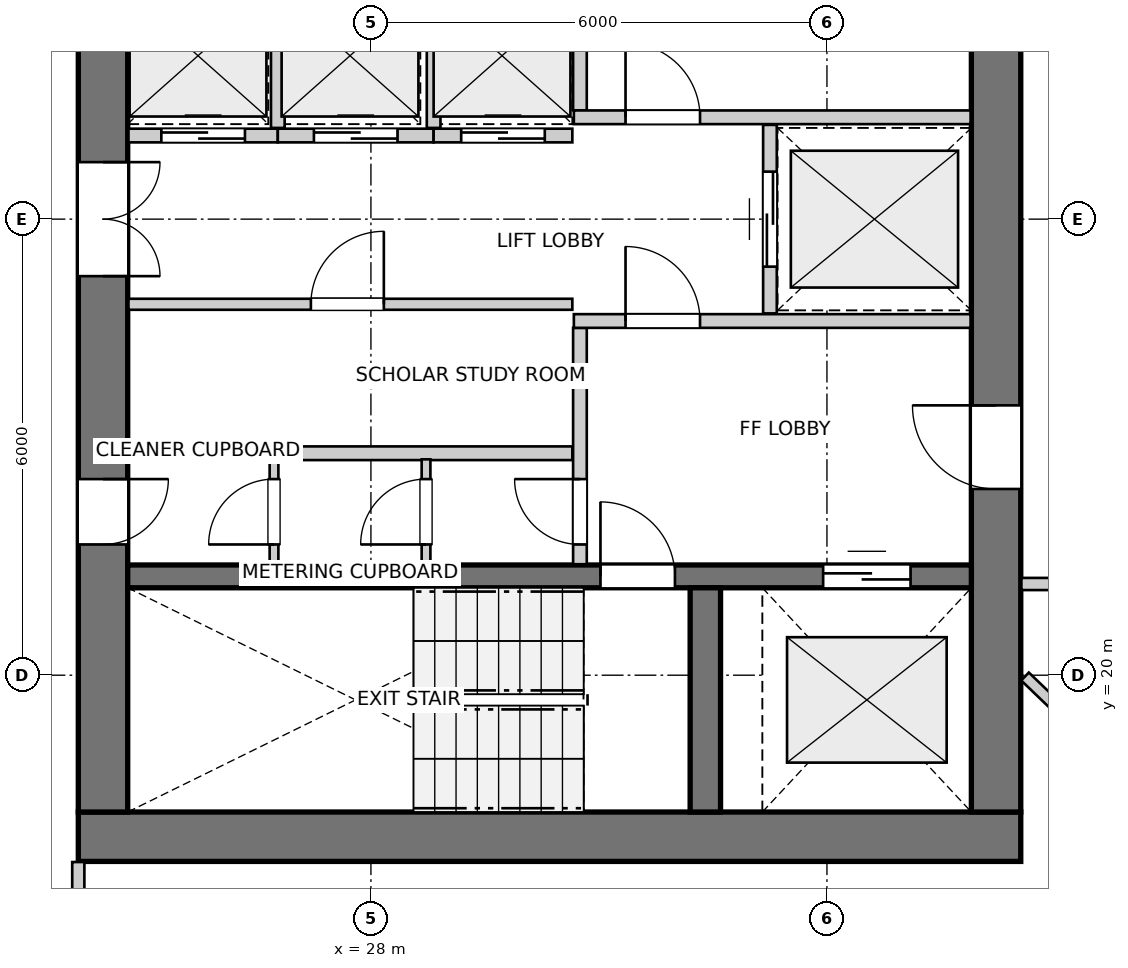
"""IFC4 building model, lengths in metres.
Left out: names, types, materials, properties, quantities, classifications, styles, units other than length and angle.
Written with IfcOpenShell. Run it as: python <this file> out.ifc"""

import sys

from ifc_helpers import new_model, si_unit, direction, frame, frame_2d, origin, place, context, subcontext, project, spatial, rectangle, extrude, source, transform, mapped, element, fill, save


model = new_model("IFC4")
c1 = context("Model", 3, precision=1e-05, world=origin(), true_north=direction((0.0, 1.0)))
c2 = subcontext(c1, "Body", "Model", "MODEL_VIEW")
j1 = project(units=[si_unit("LENGTHUNIT", "METRE"), si_unit("PLANEANGLEUNIT", "RADIAN")], contexts=[c1])
p1 = place(None, origin())
s1 = spatial("IfcSite", under=j1, at=p1, CompositionType="ELEMENT")
p2 = place(p1, origin())
s2 = spatial("IfcBuilding", under=s1, at=p2, CompositionType="ELEMENT")
p3 = place(p2, frame((0.0, 0.0, 158.6)))
s3 = spatial("IfcBuildingStorey", under=s2, at=p3, CompositionType="ELEMENT", Elevation=158.6)
p4 = place(p3, frame((24.15, 17.875, 0.0), z_axis=(0.0, 0.0, 1.0), x_axis=(1.0, 0.0, 0.0)))
e1 = element("IfcWall", 1, at=p4, inside=s3, PredefinedType="SHEAR", context=c2, shape_type="SweptSolid", body=[
    extrude(rectangle(XDim=12.4, YDim=0.65, at=frame_2d((6.2, 0.0))), origin(), (0.0, 0.0, 1.0), 2.95),
])
p5 = place(p3, frame((24.475, 33.8, 0.0), z_axis=(0.0, 0.0, 1.0), x_axis=(0.0, -1.0, 0.0)))
e2 = element("IfcWall", 2, at=p5, inside=s3, PredefinedType="SHEAR", context=c2, shape_type="SweptSolid", body=[
    extrude(rectangle(XDim=15.6, YDim=0.65, at=frame_2d((7.8, 0.0))), origin(), (0.0, 0.0, 1.0), 2.95),
])
p6 = place(p5, frame((7.05, 0.0, 0.0)))
e3 = element("IfcOpeningElement", 3, at=p6, cuts=e2, PredefinedType="OPENING", context=c2, shape_type="SweptSolid", body=[
    extrude(rectangle(XDim=1.5, YDim=2.15, at=frame_2d((0.75, 1.075))), frame((0.0, 0.335, 0.0), z_axis=(0.0, -1.0, 0.0), x_axis=(1.0, 0.0, 0.0)), (0.0, 0.0, 1.0), 0.67),
])
p7 = place(p5, frame((3.52, 0.0, 0.0)))
e4 = element("IfcOpeningElement", 4, at=p7, cuts=e2, PredefinedType="OPENING", context=c2, shape_type="SweptSolid", body=[
    extrude(rectangle(XDim=0.86, YDim=2.05, at=frame_2d((0.43, 1.025))), frame((0.0, 0.335, 0.0), z_axis=(0.0, -1.0, 0.0), x_axis=(1.0, 0.0, 0.0)), (0.0, 0.0, 1.0), 0.67),
])
p8 = place(p5, frame((11.22, 0.0, 0.0)))
e5 = element("IfcOpeningElement", 5, at=p8, cuts=e2, PredefinedType="OPENING", context=c2, shape_type="SweptSolid", body=[
    extrude(rectangle(XDim=0.86, YDim=2.05, at=frame_2d((0.43, 1.025))), frame((0.0, 0.335, 0.0), z_axis=(0.0, -1.0, 0.0), x_axis=(1.0, 0.0, 0.0)), (0.0, 0.0, 1.0), 0.67),
])
p9 = place(p3, frame((36.225, 18.2, 0.0), z_axis=(0.0, 0.0, 1.0), x_axis=(0.0, 1.0, 0.0)))
e6 = element("IfcWall", 6, at=p9, inside=s3, PredefinedType="SHEAR", context=c2, shape_type="SweptSolid", body=[
    extrude(rectangle(XDim=15.6, YDim=0.65, at=frame_2d((7.8, 0.0))), origin(), (0.0, 0.0, 1.0), 2.95),
])
p10 = place(p9, frame((4.25, 0.0, 0.0)))
e7 = element("IfcOpeningElement", 7, at=p10, cuts=e6, PredefinedType="OPENING", context=c2, shape_type="SweptSolid", body=[
    extrude(rectangle(XDim=1.1, YDim=2.15, at=frame_2d((0.55, 1.075))), frame((0.0, 0.335, 0.0), z_axis=(0.0, -1.0, 0.0), x_axis=(1.0, 0.0, 0.0)), (0.0, 0.0, 1.0), 0.67),
])
p11 = place(p9, frame((10.25, 0.0, 0.0)))
e8 = element("IfcOpeningElement", 8, at=p11, cuts=e6, PredefinedType="OPENING", context=c2, shape_type="SweptSolid", body=[
    extrude(rectangle(XDim=1.1, YDim=2.15, at=frame_2d((0.55, 1.075))), frame((0.0, 0.335, 0.0), z_axis=(0.0, -1.0, 0.0), x_axis=(1.0, 0.0, 0.0)), (0.0, 0.0, 1.0), 0.67),
])
p12 = place(p3, frame((24.8, 21.3, 0.0), z_axis=(0.0, 0.0, 1.0), x_axis=(1.0, 0.0, 0.0)))
e9 = element("IfcWall", 9, at=p12, inside=s3, PredefinedType="SHEAR", context=c2, shape_type="SweptSolid", body=[
    extrude(rectangle(XDim=11.1, YDim=0.3, at=frame_2d((5.55, 0.0))), origin(), (0.0, 0.0, 1.0), 2.95),
])
p13 = place(p12, frame((6.22, 0.0, 0.0)))
e10 = element("IfcOpeningElement", 10, at=p13, cuts=e9, PredefinedType="OPENING", context=c2, shape_type="SweptSolid", body=[
    extrude(rectangle(XDim=0.98, YDim=2.15, at=frame_2d((0.49, 1.075))), frame((0.0, 0.16, 0.0), z_axis=(0.0, -1.0, 0.0), x_axis=(1.0, 0.0, 0.0)), (0.0, 0.0, 1.0), 0.32),
])
p14 = place(p12, frame((9.15, 0.0, 0.0)))
e11 = element("IfcOpeningElement", 11, at=p14, cuts=e9, PredefinedType="OPENING", context=c2, shape_type="SweptSolid", body=[
    extrude(rectangle(XDim=1.15, YDim=2.15, at=frame_2d((0.575, 1.075))), frame((0.0, 0.16, 0.0), z_axis=(0.0, -1.0, 0.0), x_axis=(1.0, 0.0, 0.0)), (0.0, 0.0, 1.0), 0.32),
])
p15 = place(p3, frame((32.4, 18.2, 0.0), z_axis=(0.0, 0.0, 1.0), x_axis=(0.0, 1.0, 0.0)))
e12 = element("IfcWall", 12, at=p15, inside=s3, PredefinedType="SHEAR", context=c2, shape_type="SweptSolid", body=[
    extrude(rectangle(XDim=2.95, YDim=0.4, at=frame_2d((1.475, 0.0))), origin(), (0.0, 0.0, 1.0), 2.95),
])
p16 = place(p3, frame((30.75, 21.46, 0.0), z_axis=(0.0, 0.0, 1.0), x_axis=(0.0, 1.0, 0.0)))
e13 = element("IfcWall", 13, at=p16, inside=s3, PredefinedType="PARTITIONING", context=c2, shape_type="SweptSolid", body=[
    extrude(rectangle(XDim=3.11, YDim=0.18, at=frame_2d((1.555, 0.0))), origin(), (0.0, 0.0, 1.0), 2.95),
])
p17 = place(p16, frame((0.26, 0.0, 0.0)))
e14 = element("IfcOpeningElement", 14, at=p17, cuts=e13, PredefinedType="OPENING", context=c2, shape_type="SweptSolid", body=[
    extrude(rectangle(XDim=0.86, YDim=2.05, at=frame_2d((0.43, 1.025))), frame((0.0, 0.1, 0.0), z_axis=(0.0, -1.0, 0.0), x_axis=(1.0, 0.0, 0.0)), (0.0, 0.0, 1.0), 0.2),
])
p18 = place(p3, frame((30.67, 24.66, 0.0), z_axis=(0.0, 0.0, 1.0), x_axis=(1.0, 0.0, 0.0)))
e15 = element("IfcWall", 15, at=p18, inside=s3, PredefinedType="PARTITIONING", context=c2, shape_type="SweptSolid", body=[
    extrude(rectangle(XDim=5.22, YDim=0.18, at=frame_2d((2.61, 0.0))), origin(), (0.0, 0.0, 1.0), 2.95),
])
p19 = place(p18, frame((0.68, 0.0, 0.0)))
e16 = element("IfcOpeningElement", 16, at=p19, cuts=e15, PredefinedType="OPENING", context=c2, shape_type="SweptSolid", body=[
    extrude(rectangle(XDim=0.98, YDim=2.15, at=frame_2d((0.49, 1.075))), frame((0.0, 0.1, 0.0), z_axis=(0.0, -1.0, 0.0), x_axis=(1.0, 0.0, 0.0)), (0.0, 0.0, 1.0), 0.2),
])
p20 = place(p3, frame((30.75, 27.43, 0.0), z_axis=(0.0, 0.0, 1.0), x_axis=(0.0, 1.0, 0.0)))
e17 = element("IfcWall", 17, at=p20, inside=s3, PredefinedType="PARTITIONING", context=c2, shape_type="SweptSolid", body=[
    extrude(rectangle(XDim=3.11, YDim=0.18, at=frame_2d((1.555, 0.0))), origin(), (0.0, 0.0, 1.0), 2.95),
])
p21 = place(p20, frame((1.98, 0.0, 0.0)))
e18 = element("IfcOpeningElement", 18, at=p21, cuts=e17, PredefinedType="OPENING", context=c2, shape_type="SweptSolid", body=[
    extrude(rectangle(XDim=0.86, YDim=2.05, at=frame_2d((0.43, 1.025))), frame((0.0, 0.1, 0.0), z_axis=(0.0, -1.0, 0.0), x_axis=(1.0, 0.0, 0.0)), (0.0, 0.0, 1.0), 0.2),
])
p22 = place(p3, frame((30.67, 27.34, 0.0), z_axis=(0.0, 0.0, 1.0), x_axis=(1.0, 0.0, 0.0)))
e19 = element("IfcWall", 19, at=p22, inside=s3, PredefinedType="PARTITIONING", context=c2, shape_type="SweptSolid", body=[
    extrude(rectangle(XDim=5.22, YDim=0.18, at=frame_2d((2.61, 0.0))), origin(), (0.0, 0.0, 1.0), 2.95),
])
p23 = place(p22, frame((0.68, 0.0, 0.0)))
e20 = element("IfcOpeningElement", 20, at=p23, cuts=e19, PredefinedType="OPENING", context=c2, shape_type="SweptSolid", body=[
    extrude(rectangle(XDim=0.98, YDim=2.15, at=frame_2d((0.49, 1.075))), frame((0.0, 0.1, 0.0), z_axis=(0.0, -1.0, 0.0), x_axis=(1.0, 0.0, 0.0)), (0.0, 0.0, 1.0), 0.2),
])
p24 = place(p3, frame((33.25, 24.76, 0.0), z_axis=(0.0, 0.0, 1.0), x_axis=(0.0, 1.0, 0.0)))
e21 = element("IfcWall", 21, at=p24, inside=s3, PredefinedType="PARTITIONING", context=c2, shape_type="SweptSolid", body=[
    extrude(rectangle(XDim=2.48, YDim=0.18, at=frame_2d((1.24, 0.0))), origin(), (0.0, 0.0, 1.0), 2.95),
])
p25 = place(p24, frame((0.615, 0.0, 0.0)))
e22 = element("IfcOpeningElement", 22, at=p25, cuts=e21, PredefinedType="OPENING", context=c2, shape_type="SweptSolid", body=[
    extrude(rectangle(XDim=1.25, YDim=2.15, at=frame_2d((0.625, 1.075))), frame((0.0, 0.1, 0.0), z_axis=(0.0, -1.0, 0.0), x_axis=(1.0, 0.0, 0.0)), (0.0, 0.0, 1.0), 0.2),
])
p26 = place(p3, frame((24.81, 22.92, 0.0), z_axis=(0.0, 0.0, 1.0), x_axis=(1.0, 0.0, 0.0)))
e23 = element("IfcWall", 23, at=p26, inside=s3, PredefinedType="PARTITIONING", context=c2, shape_type="SweptSolid", body=[
    extrude(rectangle(XDim=5.84, YDim=0.18, at=frame_2d((2.92, 0.0))), origin(), (0.0, 0.0, 1.0), 2.95),
])
p27 = place(p3, frame((24.81, 24.88, 0.0), z_axis=(0.0, 0.0, 1.0), x_axis=(1.0, 0.0, 0.0)))
e24 = element("IfcWall", 24, at=p27, inside=s3, PredefinedType="PARTITIONING", context=c2, shape_type="SweptSolid", body=[
    extrude(rectangle(XDim=5.84, YDim=0.145, at=frame_2d((2.92, 0.0))), origin(), (0.0, 0.0, 1.0), 2.95),
])
p28 = place(p27, frame((2.4, 0.0, 0.0)))
e25 = element("IfcOpeningElement", 25, at=p28, cuts=e24, PredefinedType="OPENING", context=c2, shape_type="SweptSolid", body=[
    extrude(rectangle(XDim=0.96, YDim=2.1, at=frame_2d((0.48, 1.05))), frame((0.0, 0.083, 0.0), z_axis=(0.0, -1.0, 0.0), x_axis=(1.0, 0.0, 0.0)), (0.0, 0.0, 1.0), 0.165),
])
p29 = place(p3, frame((24.81, 27.1, 0.0), z_axis=(0.0, 0.0, 1.0), x_axis=(1.0, 0.0, 0.0)))
e26 = element("IfcWall", 26, at=p29, inside=s3, PredefinedType="PARTITIONING", context=c2, shape_type="SweptSolid", body=[
    extrude(rectangle(XDim=1.965, YDim=0.18, at=frame_2d((0.982, 0.0))), origin(), (0.0, 0.0, 1.0), 2.95),
])
p30 = place(p29, frame((0.433, 0.0, 0.0)))
e27 = element("IfcOpeningElement", 27, at=p30, cuts=e26, PredefinedType="OPENING", context=c2, shape_type="SweptSolid", body=[
    extrude(rectangle(XDim=1.1, YDim=2.15, at=frame_2d((0.55, 1.075))), frame((0.0, 0.1, 0.0), z_axis=(0.0, -1.0, 0.0), x_axis=(1.0, 0.0, 0.0)), (0.0, 0.0, 1.0), 0.2),
])
p31 = place(p3, frame((26.775, 27.1, 0.0), z_axis=(0.0, 0.0, 1.0), x_axis=(1.0, 0.0, 0.0)))
e28 = element("IfcWall", 28, at=p31, inside=s3, PredefinedType="PARTITIONING", context=c2, shape_type="SweptSolid", body=[
    extrude(rectangle(XDim=2.05, YDim=0.18, at=frame_2d((1.025, 0.0))), origin(), (0.0, 0.0, 1.0), 2.95),
])
p32 = place(p31, frame((0.475, 0.0, 0.0)))
e29 = element("IfcOpeningElement", 29, at=p32, cuts=e28, PredefinedType="OPENING", context=c2, shape_type="SweptSolid", body=[
    extrude(rectangle(XDim=1.1, YDim=2.15, at=frame_2d((0.55, 1.075))), frame((0.0, 0.1, 0.0), z_axis=(0.0, -1.0, 0.0), x_axis=(1.0, 0.0, 0.0)), (0.0, 0.0, 1.0), 0.2),
])
p33 = place(p3, frame((26.775, 27.2, 0.0), z_axis=(0.0, 0.0, 1.0), x_axis=(0.0, 1.0, 0.0)))
e30 = element("IfcWall", 30, at=p33, inside=s3, PredefinedType="PARTITIONING", context=c2, shape_type="SweptSolid", body=[
    extrude(rectangle(XDim=1.78, YDim=0.18, at=frame_2d((0.89, 0.0))), origin(), (0.0, 0.0, 1.0), 2.95),
])
p34 = place(p3, frame((28.825, 27.1, 0.0), z_axis=(0.0, 0.0, 1.0), x_axis=(1.0, 0.0, 0.0)))
e31 = element("IfcWall", 31, at=p34, inside=s3, PredefinedType="PARTITIONING", context=c2, shape_type="SweptSolid", body=[
    extrude(rectangle(XDim=1.825, YDim=0.18, at=frame_2d((0.913, 0.0))), origin(), (0.0, 0.0, 1.0), 2.95),
])
p35 = place(p34, frame((0.363, 0.0, 0.0)))
e32 = element("IfcOpeningElement", 32, at=p35, cuts=e31, PredefinedType="OPENING", context=c2, shape_type="SweptSolid", body=[
    extrude(rectangle(XDim=1.1, YDim=2.15, at=frame_2d((0.55, 1.075))), frame((0.0, 0.1, 0.0), z_axis=(0.0, -1.0, 0.0), x_axis=(1.0, 0.0, 0.0)), (0.0, 0.0, 1.0), 0.2),
])
p36 = place(p3, frame((28.825, 27.2, 0.0), z_axis=(0.0, 0.0, 1.0), x_axis=(0.0, 1.0, 0.0)))
e33 = element("IfcWall", 33, at=p36, inside=s3, PredefinedType="PARTITIONING", context=c2, shape_type="SweptSolid", body=[
    extrude(rectangle(XDim=1.78, YDim=0.18, at=frame_2d((0.89, 0.0))), origin(), (0.0, 0.0, 1.0), 2.95),
])
p37 = place(p3, frame((26.725, 21.46, 0.0), z_axis=(0.0, 0.0, 1.0), x_axis=(0.0, 1.0, 0.0)))
e34 = element("IfcWall", 34, at=p37, inside=s3, PredefinedType="PARTITIONING", context=c2, shape_type="SweptSolid", body=[
    extrude(rectangle(XDim=1.38, YDim=0.115, at=frame_2d((0.69, 0.0))), origin(), (0.0, 0.0, 1.0), 2.95),
])
p38 = place(p37, frame((0.26, 0.0, 0.0)))
e35 = element("IfcOpeningElement", 35, at=p38, cuts=e34, PredefinedType="OPENING", context=c2, shape_type="SweptSolid", body=[
    extrude(rectangle(XDim=0.86, YDim=2.05, at=frame_2d((0.43, 1.025))), frame((0.0, 0.067, 0.0), z_axis=(0.0, -1.0, 0.0), x_axis=(1.0, 0.0, 0.0)), (0.0, 0.0, 1.0), 0.135),
])
p39 = place(p3, frame((28.725, 21.46, 0.0), z_axis=(0.0, 0.0, 1.0), x_axis=(0.0, 1.0, 0.0)))
e36 = element("IfcWall", 36, at=p39, inside=s3, PredefinedType="PARTITIONING", context=c2, shape_type="SweptSolid", body=[
    extrude(rectangle(XDim=1.38, YDim=0.115, at=frame_2d((0.69, 0.0))), origin(), (0.0, 0.0, 1.0), 2.95),
])
p40 = place(p39, frame((0.26, 0.0, 0.0)))
e37 = element("IfcOpeningElement", 37, at=p40, cuts=e36, PredefinedType="OPENING", context=c2, shape_type="SweptSolid", body=[
    extrude(rectangle(XDim=0.86, YDim=2.05, at=frame_2d((0.43, 1.025))), frame((0.0, 0.067, 0.0), z_axis=(0.0, -1.0, 0.0), x_axis=(1.0, 0.0, 0.0)), (0.0, 0.0, 1.0), 0.135),
])
p41 = place(p3, frame((24.15, 17.542, 0.0), z_axis=(0.0, 0.0, 1.0), x_axis=(0.0, -1.0, 0.0)))
e38 = element("IfcWall", 38, at=p41, inside=s3, PredefinedType="PARTITIONING", context=c2, shape_type="SweptSolid", body=[
    extrude(rectangle(XDim=3.945, YDim=0.16, at=frame_2d((1.973, 0.0))), origin(), (0.0, 0.0, 1.0), 2.95),
])
p42 = place(p41, frame((1.319, 0.0, 0.0)))
e39 = element("IfcOpeningElement", 39, at=p42, cuts=e38, PredefinedType="OPENING", context=c2, shape_type="SweptSolid", body=[
    extrude(rectangle(XDim=1.3, YDim=2.1, at=frame_2d((0.65, 1.05))), frame((0.0, 0.09, 0.0), z_axis=(0.0, -1.0, 0.0), x_axis=(1.0, 0.0, 0.0)), (0.0, 0.0, 1.0), 0.18),
])
p43 = place(p3, frame((36.606, 19.983, 0.0), z_axis=(0.0, 0.0, 1.0), x_axis=(0.720776649136, -0.69316738387, 0.0)))
e40 = element("IfcWall", 40, at=p43, inside=s3, PredefinedType="PARTITIONING", context=c2, shape_type="SweptSolid", body=[
    extrude(rectangle(XDim=7.401, YDim=0.145, at=frame_2d((3.701, 0.0))), origin(), (0.0, 0.0, 1.0), 2.95),
])
p44 = place(p3, frame((36.558, 21.2, 0.0), z_axis=(0.0, 0.0, 1.0), x_axis=(1.0, 0.0, 0.0)))
e41 = element("IfcWall", 41, at=p44, inside=s3, PredefinedType="PARTITIONING", context=c2, shape_type="SweptSolid", body=[
    extrude(rectangle(XDim=1.684, YDim=0.16, at=frame_2d((0.842, 0.0))), origin(), (0.0, 0.0, 1.0), 2.95),
])
m1 = source(origin(), c2, "Body", "SweptSolid", [
    extrude(rectangle(XDim=0.98, YDim=2.15, at=frame_2d((0.49, 1.075))), frame((0.0, 0.025, 0.0), z_axis=(0.0, -1.0, 0.0), x_axis=(1.0, 0.0, 0.0)), (0.0, 0.0, 1.0), 0.05),
])
p45 = place(p13, origin())
e42 = element("IfcDoor", 42, at=p45, inside=s3, OperationType="SINGLE_SWING_LEFT", PredefinedType="DOOR", context=c2, shape_type="MappedRepresentation", body=[
    mapped(m1, transform((0.0, 0.0, 0.0), x_axis=(1.0, 0.0, 0.0), y_axis=(0.0, 1.0, 0.0), z_axis=(0.0, 0.0, 1.0), scale=1.0)),
])
fill(e10, e42)
m2 = source(origin(), c2, "Body", "SweptSolid", [
    extrude(rectangle(XDim=1.15, YDim=2.15, at=frame_2d((0.575, 1.075))), frame((0.0, 0.025, 0.0), z_axis=(0.0, -1.0, 0.0), x_axis=(1.0, 0.0, 0.0)), (0.0, 0.0, 1.0), 0.05),
])
p46 = place(p14, origin())
e43 = element("IfcDoor", 43, at=p46, inside=s3, OperationType="DOUBLE_DOOR_SLIDING", PredefinedType="DOOR", context=c2, shape_type="MappedRepresentation", body=[
    mapped(m2, transform((0.0, 0.0, 0.0), x_axis=(1.0, 0.0, 0.0), y_axis=(0.0, 1.0, 0.0), z_axis=(0.0, 0.0, 1.0), scale=1.0)),
])
fill(e11, e43)
m3 = source(origin(), c2, "Body", "SweptSolid", [
    extrude(rectangle(XDim=1.1, YDim=2.15, at=frame_2d((0.55, 1.075))), frame((0.0, 0.025, 0.0), z_axis=(0.0, -1.0, 0.0), x_axis=(1.0, 0.0, 0.0)), (0.0, 0.0, 1.0), 0.05),
])
p47 = place(p10, origin())
e44 = element("IfcDoor", 44, at=p47, inside=s3, OperationType="SINGLE_SWING_RIGHT", PredefinedType="DOOR", context=c2, shape_type="MappedRepresentation", body=[
    mapped(m3, transform((0.0, 0.0, 0.0), x_axis=(1.0, 0.0, 0.0), y_axis=(0.0, 1.0, 0.0), z_axis=(0.0, 0.0, 1.0), scale=1.0)),
])
fill(e7, e44)
m4 = source(origin(), c2, "Body", "SweptSolid", [
    extrude(rectangle(XDim=1.5, YDim=2.15, at=frame_2d((0.75, 1.075))), frame((0.0, 0.025, 0.0), z_axis=(0.0, -1.0, 0.0), x_axis=(1.0, 0.0, 0.0)), (0.0, 0.0, 1.0), 0.05),
])
p48 = place(p6, origin())
e45 = element("IfcDoor", 45, at=p48, inside=s3, OperationType="DOUBLE_DOOR_SINGLE_SWING", PredefinedType="DOOR", context=c2, shape_type="MappedRepresentation", body=[
    mapped(m4, transform((0.0, 0.0, 0.0), x_axis=(1.0, 0.0, 0.0), y_axis=(0.0, 1.0, 0.0), z_axis=(0.0, 0.0, 1.0), scale=1.0)),
])
fill(e3, e45)
m5 = source(origin(), c2, "Body", "SweptSolid", [
    extrude(rectangle(XDim=0.86, YDim=2.05, at=frame_2d((0.43, 1.025))), frame((0.0, 0.025, 0.0), z_axis=(0.0, -1.0, 0.0), x_axis=(1.0, 0.0, 0.0)), (0.0, 0.0, 1.0), 0.05),
])
p49 = place(p8, origin())
e46 = element("IfcDoor", 46, at=p49, inside=s3, OperationType="SINGLE_SWING_LEFT", PredefinedType="DOOR", context=c2, shape_type="MappedRepresentation", body=[
    mapped(m5, transform((0.0, 0.0, 0.0), x_axis=(1.0, 0.0, 0.0), y_axis=(0.0, 1.0, 0.0), z_axis=(0.0, 0.0, 1.0), scale=1.0)),
])
fill(e5, e46)
p50 = place(p17, origin())
e47 = element("IfcDoor", 47, at=p50, inside=s3, OperationType="SINGLE_SWING_RIGHT", PredefinedType="DOOR", context=c2, shape_type="MappedRepresentation", body=[
    mapped(m5, transform((0.0, 0.0, 0.0), x_axis=(1.0, 0.0, 0.0), y_axis=(0.0, 1.0, 0.0), z_axis=(0.0, 0.0, 1.0), scale=1.0)),
])
fill(e14, e47)
p51 = place(p19, origin())
e48 = element("IfcDoor", 48, at=p51, inside=s3, OperationType="SINGLE_SWING_LEFT", PredefinedType="DOOR", context=c2, shape_type="MappedRepresentation", body=[
    mapped(m1, transform((0.0, 0.0, 0.0), x_axis=(1.0, 0.0, 0.0), y_axis=(0.0, 1.0, 0.0), z_axis=(0.0, 0.0, 1.0), scale=1.0)),
])
fill(e16, e48)
p52 = place(p23, origin())
e49 = element("IfcDoor", 49, at=p52, inside=s3, OperationType="SINGLE_SWING_LEFT", PredefinedType="DOOR", context=c2, shape_type="MappedRepresentation", body=[
    mapped(m1, transform((0.0, 0.0, 0.0), x_axis=(1.0, 0.0, 0.0), y_axis=(0.0, 1.0, 0.0), z_axis=(0.0, 0.0, 1.0), scale=1.0)),
])
fill(e20, e49)
m6 = source(origin(), c2, "Body", "SweptSolid", [
    extrude(rectangle(XDim=1.25, YDim=2.15, at=frame_2d((0.625, 1.075))), frame((0.0, 0.025, 0.0), z_axis=(0.0, -1.0, 0.0), x_axis=(1.0, 0.0, 0.0)), (0.0, 0.0, 1.0), 0.05),
])
p53 = place(p25, origin())
e50 = element("IfcDoor", 50, at=p53, inside=s3, OperationType="DOUBLE_DOOR_SLIDING", PredefinedType="DOOR", context=c2, shape_type="MappedRepresentation", body=[
    mapped(m6, transform((0.0, 0.0, 0.0), x_axis=(1.0, 0.0, 0.0), y_axis=(0.0, 1.0, 0.0), z_axis=(0.0, 0.0, 1.0), scale=1.0)),
])
fill(e22, e50)
m7 = source(origin(), c2, "Body", "SweptSolid", [
    extrude(rectangle(XDim=0.96, YDim=2.1, at=frame_2d((0.48, 1.05))), frame((0.0, 0.025, 0.0), z_axis=(0.0, -1.0, 0.0), x_axis=(1.0, 0.0, 0.0)), (0.0, 0.0, 1.0), 0.05),
])
p54 = place(p28, origin())
e51 = element("IfcDoor", 51, at=p54, inside=s3, OperationType="SINGLE_SWING_RIGHT", PredefinedType="DOOR", context=c2, shape_type="MappedRepresentation", body=[
    mapped(m7, transform((0.0, 0.0, 0.0), x_axis=(1.0, 0.0, 0.0), y_axis=(0.0, 1.0, 0.0), z_axis=(0.0, 0.0, 1.0), scale=1.0)),
])
fill(e25, e51)
p55 = place(p30, origin())
e52 = element("IfcDoor", 52, at=p55, inside=s3, OperationType="DOUBLE_DOOR_SLIDING", PredefinedType="DOOR", context=c2, shape_type="MappedRepresentation", body=[
    mapped(m3, transform((0.0, 0.0, 0.0), x_axis=(1.0, 0.0, 0.0), y_axis=(0.0, 1.0, 0.0), z_axis=(0.0, 0.0, 1.0), scale=1.0)),
])
fill(e27, e52)
p56 = place(p32, origin())
e53 = element("IfcDoor", 53, at=p56, inside=s3, OperationType="DOUBLE_DOOR_SLIDING", PredefinedType="DOOR", context=c2, shape_type="MappedRepresentation", body=[
    mapped(m3, transform((0.0, 0.0, 0.0), x_axis=(1.0, 0.0, 0.0), y_axis=(0.0, 1.0, 0.0), z_axis=(0.0, 0.0, 1.0), scale=1.0)),
])
fill(e29, e53)
p57 = place(p35, origin())
e54 = element("IfcDoor", 54, at=p57, inside=s3, OperationType="DOUBLE_DOOR_SLIDING", PredefinedType="DOOR", context=c2, shape_type="MappedRepresentation", body=[
    mapped(m3, transform((0.0, 0.0, 0.0), x_axis=(1.0, 0.0, 0.0), y_axis=(0.0, 1.0, 0.0), z_axis=(0.0, 0.0, 1.0), scale=1.0)),
])
fill(e32, e54)
p58 = place(p38, origin())
e55 = element("IfcDoor", 55, at=p58, inside=s3, OperationType="SINGLE_SWING_LEFT", PredefinedType="DOOR", context=c2, shape_type="MappedRepresentation", body=[
    mapped(m5, transform((0.0, 0.0, 0.0), x_axis=(1.0, 0.0, 0.0), y_axis=(0.0, 1.0, 0.0), z_axis=(0.0, 0.0, 1.0), scale=1.0)),
])
fill(e35, e55)
p59 = place(p40, origin())
e56 = element("IfcDoor", 56, at=p59, inside=s3, OperationType="SINGLE_SWING_LEFT", PredefinedType="DOOR", context=c2, shape_type="MappedRepresentation", body=[
    mapped(m5, transform((0.0, 0.0, 0.0), x_axis=(1.0, 0.0, 0.0), y_axis=(0.0, 1.0, 0.0), z_axis=(0.0, 0.0, 1.0), scale=1.0)),
])
fill(e37, e56)
save(model, sys.argv[1])
